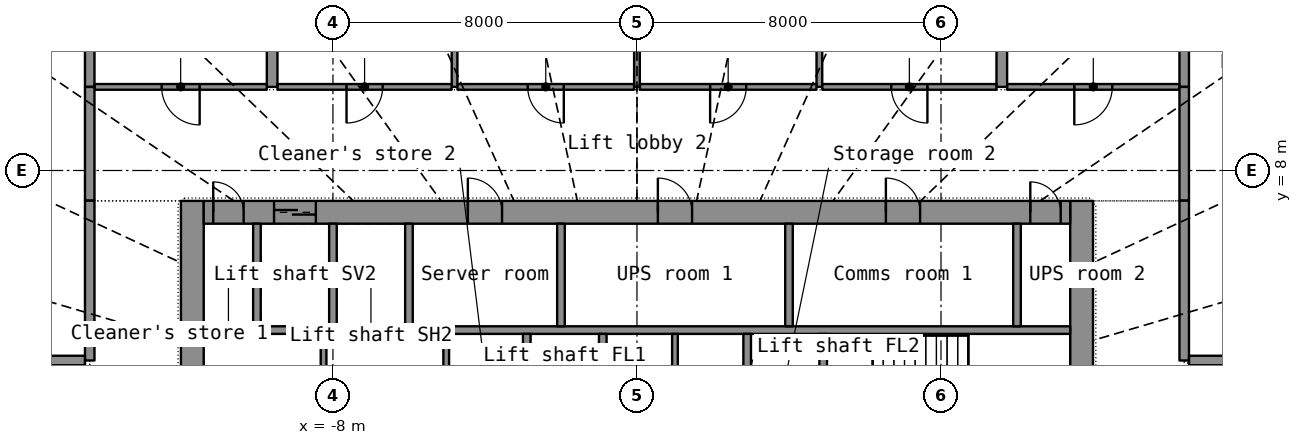
"""IFC4 building model, lengths in metres.
Left out: names, types, materials, properties, quantities, classifications, styles, units other than length and angle.
Written with IfcOpenShell. Run it as: python <this file> out.ifc"""

import sys

from ifc_helpers import new_model, si_unit, direction, frame, frame_2d, origin, place, context, subcontext, project, spatial, rectangle, extrude, element, fill, save


model = new_model("IFC4")
c1 = context("Model", 3, precision=1e-05, world=origin(), true_north=direction((0.0, 1.0)))
c2 = subcontext(c1, "Body", "Model", "MODEL_VIEW")
j1 = project(units=[si_unit("LENGTHUNIT", "METRE"), si_unit("PLANEANGLEUNIT", "RADIAN")], contexts=[c1])
p1 = place(None, origin())
s1 = spatial("IfcSite", under=j1, at=p1, CompositionType="ELEMENT")
p2 = place(p1, origin())
s2 = spatial("IfcBuilding", under=s1, at=p2, CompositionType="ELEMENT")
p3 = place(p2, frame((0.0, 0.0, 7.0)))
s3 = spatial("IfcBuildingStorey", under=s2, at=p3, CompositionType="ELEMENT", Elevation=7.0)
p4 = place(p3, frame((-11.7, -7.2, 0.0), z_axis=(0.0, 0.0, 1.0), x_axis=(0.0, 1.0, 0.0)))
e1 = element("IfcWall", 1, at=p4, inside=s3, PredefinedType="SHEAR", context=c2, shape_type="SweptSolid", body=[
    extrude(rectangle(XDim=14.4, YDim=0.6, at=frame_2d((7.2, 0.0))), origin(), (0.0, 0.0, 1.0), 6.1),
])
p5 = place(p4, frame((6.5, 0.0, 0.0)))
e2 = element("IfcOpeningElement", 2, at=p5, cuts=e1, PredefinedType="OPENING", context=c2, shape_type="SweptSolid", body=[
    extrude(rectangle(XDim=1.4, YDim=2.2, at=frame_2d((0.7, 1.1))), frame((0.0, 0.31, 0.0), z_axis=(0.0, -1.0, 0.0), x_axis=(1.0, 0.0, 0.0)), (0.0, 0.0, 1.0), 0.62),
])
p6 = place(p3, frame((11.7, -7.2, 0.0), z_axis=(0.0, 0.0, 1.0), x_axis=(0.0, 1.0, 0.0)))
e3 = element("IfcWall", 3, at=p6, inside=s3, PredefinedType="SHEAR", context=c2, shape_type="SweptSolid", body=[
    extrude(rectangle(XDim=14.4, YDim=0.6, at=frame_2d((7.2, 0.0))), origin(), (0.0, 0.0, 1.0), 6.1),
])
p7 = place(p6, frame((6.5, 0.0, 0.0)))
e4 = element("IfcOpeningElement", 4, at=p7, cuts=e3, PredefinedType="OPENING", context=c2, shape_type="SweptSolid", body=[
    extrude(rectangle(XDim=1.4, YDim=2.2, at=frame_2d((0.7, 1.1))), frame((0.0, 0.31, 0.0), z_axis=(0.0, -1.0, 0.0), x_axis=(1.0, 0.0, 0.0)), (0.0, 0.0, 1.0), 0.62),
])
p8 = place(p3, frame((-11.4, 6.9, 0.0), z_axis=(0.0, 0.0, 1.0), x_axis=(1.0, 0.0, 0.0)))
e5 = element("IfcWall", 5, at=p8, inside=s3, PredefinedType="SHEAR", context=c2, shape_type="SweptSolid", body=[
    extrude(rectangle(XDim=22.8, YDim=0.6, at=frame_2d((11.4, 0.0))), origin(), (0.0, 0.0, 1.0), 6.1),
])
p9 = place(p8, frame((1.85, 0.0, 0.0)))
e6 = element("IfcOpeningElement", 6, at=p9, cuts=e5, PredefinedType="OPENING", context=c2, shape_type="SweptSolid", body=[
    extrude(rectangle(XDim=1.1, YDim=2.2, at=frame_2d((0.55, 1.1))), frame((0.0, 0.31, 0.0), z_axis=(0.0, -1.0, 0.0), x_axis=(1.0, 0.0, 0.0)), (0.0, 0.0, 1.0), 0.62),
])
p10 = place(p8, frame((6.95, 0.0, 0.0)))
e7 = element("IfcOpeningElement", 7, at=p10, cuts=e5, PredefinedType="OPENING", context=c2, shape_type="SweptSolid", body=[
    extrude(rectangle(XDim=0.9, YDim=2.1, at=frame_2d((0.45, 1.05))), frame((0.0, 0.31, 0.0), z_axis=(0.0, -1.0, 0.0), x_axis=(1.0, 0.0, 0.0)), (0.0, 0.0, 1.0), 0.62),
])
p11 = place(p8, frame((11.95, 0.0, 0.0)))
e8 = element("IfcOpeningElement", 8, at=p11, cuts=e5, PredefinedType="OPENING", context=c2, shape_type="SweptSolid", body=[
    extrude(rectangle(XDim=0.9, YDim=2.1, at=frame_2d((0.45, 1.05))), frame((0.0, 0.31, 0.0), z_axis=(0.0, -1.0, 0.0), x_axis=(1.0, 0.0, 0.0)), (0.0, 0.0, 1.0), 0.62),
])
p12 = place(p8, frame((17.95, 0.0, 0.0)))
e9 = element("IfcOpeningElement", 9, at=p12, cuts=e5, PredefinedType="OPENING", context=c2, shape_type="SweptSolid", body=[
    extrude(rectangle(XDim=0.9, YDim=2.1, at=frame_2d((0.45, 1.05))), frame((0.0, 0.31, 0.0), z_axis=(0.0, -1.0, 0.0), x_axis=(1.0, 0.0, 0.0)), (0.0, 0.0, 1.0), 0.62),
])
p13 = place(p8, frame((0.25, 0.0, 0.0)))
e10 = element("IfcOpeningElement", 10, at=p13, cuts=e5, PredefinedType="OPENING", context=c2, shape_type="SweptSolid", body=[
    extrude(rectangle(XDim=0.8, YDim=2.05, at=frame_2d((0.4, 1.025))), frame((0.0, 0.31, 0.0), z_axis=(0.0, -1.0, 0.0), x_axis=(1.0, 0.0, 0.0)), (0.0, 0.0, 1.0), 0.62),
])
p14 = place(p8, frame((21.75, 0.0, 0.0)))
e11 = element("IfcOpeningElement", 11, at=p14, cuts=e5, PredefinedType="OPENING", context=c2, shape_type="SweptSolid", body=[
    extrude(rectangle(XDim=0.8, YDim=2.05, at=frame_2d((0.4, 1.025))), frame((0.0, 0.31, 0.0), z_axis=(0.0, -1.0, 0.0), x_axis=(1.0, 0.0, 0.0)), (0.0, 0.0, 1.0), 0.62),
])
p15 = place(p3, frame((-11.4, 3.8, 0.0), z_axis=(0.0, 0.0, 1.0), x_axis=(1.0, 0.0, 0.0)))
e12 = element("IfcWall", 12, at=p15, inside=s3, PredefinedType="SHEAR", context=c2, shape_type="SweptSolid", body=[
    extrude(rectangle(XDim=22.8, YDim=0.2, at=frame_2d((11.4, 0.0))), origin(), (0.0, 0.0, 1.0), 6.1),
])
for number, where, z_axis, x_axis in (
    (13, (-10.0, 3.9, 0.0), (0.0, 0.0, 1.0), (0.0, 1.0, 0.0)),
    (14, (-8.0, 3.9, 0.0), (0.0, 0.0, 1.0), (0.0, 1.0, 0.0)),
    (15, (-6.0, 3.9, 0.0), (0.0, 0.0, 1.0), (0.0, 1.0, 0.0)),
    (16, (10.0, 3.9, 0.0), (0.0, 0.0, 1.0), (0.0, 1.0, 0.0)),
):
    element("IfcWall", number, at=place(p3, frame(where, z_axis=z_axis, x_axis=x_axis)), inside=s3, PredefinedType="SHEAR", context=c2, shape_type="SweptSolid", body=[
        extrude(rectangle(XDim=2.7, YDim=0.2, at=frame_2d((1.35, 0.0))), origin(), (0.0, 0.0, 1.0), 6.1),
    ])
for number, where, z_axis, x_axis in (
    (17, (-2.0, 3.9, 0.0), (0.0, 0.0, 1.0), (0.0, 1.0, 0.0)),
    (18, (4.0, 3.9, 0.0), (0.0, 0.0, 1.0), (0.0, 1.0, 0.0)),
):
    element("IfcWall", number, at=place(p3, frame(where, z_axis=z_axis, x_axis=x_axis)), inside=s3, PredefinedType="PARTITIONING", context=c2, shape_type="SweptSolid", body=[
        extrude(rectangle(XDim=2.7, YDim=0.2, at=frame_2d((1.35, 0.0))), origin(), (0.0, 0.0, 1.0), 6.1),
    ])
p16 = place(p3, frame((-2.9, -3.7, 0.0), z_axis=(0.0, 0.0, 1.0), x_axis=(0.0, 1.0, 0.0)))
e19 = element("IfcWall", 19, at=p16, inside=s3, PredefinedType="SHEAR", context=c2, shape_type="SweptSolid", body=[
    extrude(rectangle(XDim=7.4, YDim=0.2, at=frame_2d((3.7, 0.0))), origin(), (0.0, 0.0, 1.0), 6.1),
])
p17 = place(p16, frame((3.1, 0.0, 0.0)))
e20 = element("IfcOpeningElement", 20, at=p17, cuts=e19, PredefinedType="OPENING", context=c2, shape_type="SweptSolid", body=[
    extrude(rectangle(XDim=1.2, YDim=2.2, at=frame_2d((0.6, 1.1))), frame((0.0, 0.11, 0.0), z_axis=(0.0, -1.0, 0.0), x_axis=(1.0, 0.0, 0.0)), (0.0, 0.0, 1.0), 0.22),
])
p18 = place(p3, frame((2.9, -3.7, 0.0), z_axis=(0.0, 0.0, 1.0), x_axis=(0.0, 1.0, 0.0)))
e21 = element("IfcWall", 21, at=p18, inside=s3, PredefinedType="SHEAR", context=c2, shape_type="SweptSolid", body=[
    extrude(rectangle(XDim=7.4, YDim=0.2, at=frame_2d((3.7, 0.0))), origin(), (0.0, 0.0, 1.0), 6.1),
])
p19 = place(p18, frame((3.1, 0.0, 0.0)))
e22 = element("IfcOpeningElement", 22, at=p19, cuts=e21, PredefinedType="OPENING", context=c2, shape_type="SweptSolid", body=[
    extrude(rectangle(XDim=1.2, YDim=2.2, at=frame_2d((0.6, 1.1))), frame((0.0, 0.11, 0.0), z_axis=(0.0, -1.0, 0.0), x_axis=(1.0, 0.0, 0.0)), (0.0, 0.0, 1.0), 0.22),
])
for number, where, z_axis, x_axis in (
    (23, (-0.9, 1.35, 0.0), (0.0, 0.0, 1.0), (0.0, 1.0, 0.0)),
    (24, (4.9, 1.35, 0.0), (0.0, 0.0, 1.0), (0.0, 1.0, 0.0)),
):
    element("IfcWall", number, at=place(p3, frame(where, z_axis=z_axis, x_axis=x_axis)), inside=s3, PredefinedType="SHEAR", context=c2, shape_type="SweptSolid", body=[
        extrude(rectangle(XDim=2.35, YDim=0.2, at=frame_2d((1.175, 0.0))), origin(), (0.0, 0.0, 1.0), 6.1),
    ])
for number, where, z_axis, x_axis in (
    (25, (-8.247, 1.35, 0.0), (0.0, 0.0, 1.0), (0.0, 1.0, 0.0)),
    (26, (-5.019, 1.35, 0.0), (0.0, 0.0, 1.0), (0.0, 1.0, 0.0)),
    (27, (1.0, 1.35, 0.0), (0.0, 0.0, 1.0), (0.0, 1.0, 0.0)),
):
    element("IfcWall", number, at=place(p3, frame(where, z_axis=z_axis, x_axis=x_axis)), inside=s3, PredefinedType="PARTITIONING", context=c2, shape_type="SweptSolid", body=[
        extrude(rectangle(XDim=2.35, YDim=0.15, at=frame_2d((1.175, 0.0))), origin(), (0.0, 0.0, 1.0), 6.1),
    ])
p20 = place(p3, frame((0.0, 10.2, 0.0), z_axis=(0.0, 0.0, 1.0), x_axis=(0.0, 1.0, 0.0)))
e28 = element("IfcWall", 28, at=p20, inside=s3, PredefinedType="PARTITIONING", context=c2, shape_type="SweptSolid", body=[
    extrude(rectangle(XDim=13.616, YDim=0.15, at=frame_2d((6.808, 0.0))), origin(), (0.0, 0.0, 1.0), 5.1),
])
for number, where, z_axis, x_axis in (
    (29, (-4.8, 10.2, 0.0), (0.0, 0.0, 1.0), (0.0, 1.0, 0.0)),
    (30, (4.8, 10.2, 0.0), (0.0, 0.0, 1.0), (0.0, 1.0, 0.0)),
):
    element("IfcWall", number, at=place(p3, frame(where, z_axis=z_axis, x_axis=x_axis)), inside=s3, PredefinedType="PARTITIONING", context=c2, shape_type="SweptSolid", body=[
        extrude(rectangle(XDim=13.16, YDim=0.15, at=frame_2d((6.58, 0.0))), origin(), (0.0, 0.0, 1.0), 5.1),
    ])
p21 = place(p3, frame((-9.6, 10.2, 0.0), z_axis=(0.0, 0.0, 1.0), x_axis=(0.0, 1.0, 0.0)))
e31 = element("IfcWall", 31, at=p21, inside=s3, PredefinedType="PARTITIONING", context=c2, shape_type="SweptSolid", body=[
    extrude(rectangle(XDim=12.103, YDim=0.28, at=frame_2d((6.051, 0.0))), origin(), (0.0, 0.0, 1.0), 5.1),
])
p22 = place(p21, frame((4.851, 0.0, 1.0)))
e32 = element("IfcOpeningElement", 32, at=p22, cuts=e31, PredefinedType="OPENING", context=c2, shape_type="SweptSolid", body=[
    extrude(rectangle(XDim=2.4, YDim=1.2, at=frame_2d((1.2, 0.6))), frame((0.0, 0.15, 0.0), z_axis=(0.0, -1.0, 0.0), x_axis=(1.0, 0.0, 0.0)), (0.0, 0.0, 1.0), 0.3),
])
p23 = place(p3, frame((9.6, 10.2, 0.0), z_axis=(0.0, 0.0, 1.0), x_axis=(0.0, 1.0, 0.0)))
e33 = element("IfcWall", 33, at=p23, inside=s3, PredefinedType="PARTITIONING", context=c2, shape_type="SweptSolid", body=[
    extrude(rectangle(XDim=12.103, YDim=0.28, at=frame_2d((6.051, 0.0))), origin(), (0.0, 0.0, 1.0), 5.1),
])
p24 = place(p23, frame((4.851, 0.0, 1.0)))
e34 = element("IfcOpeningElement", 34, at=p24, cuts=e33, PredefinedType="OPENING", context=c2, shape_type="SweptSolid", body=[
    extrude(rectangle(XDim=2.4, YDim=1.2, at=frame_2d((1.2, 0.6))), frame((0.0, 0.15, 0.0), z_axis=(0.0, -1.0, 0.0), x_axis=(1.0, 0.0, 0.0)), (0.0, 0.0, 1.0), 0.3),
])
p25 = place(p3, frame((-14.4, 10.2, 0.0), z_axis=(0.0, 0.0, 1.0), x_axis=(0.0, 1.0, 0.0)))
e35 = element("IfcWall", 35, at=p25, inside=s3, PredefinedType="PARTITIONING", context=c2, shape_type="SweptSolid", body=[
    extrude(rectangle(XDim=10.474, YDim=0.25, at=frame_2d((5.237, 0.0))), origin(), (0.0, 0.0, 1.0), 5.1),
])
p26 = place(p25, frame((4.037, 0.0, 1.0)))
e36 = element("IfcOpeningElement", 36, at=p26, cuts=e35, PredefinedType="OPENING", context=c2, shape_type="SweptSolid", body=[
    extrude(rectangle(XDim=2.4, YDim=1.2, at=frame_2d((1.2, 0.6))), frame((0.0, 0.135, 0.0), z_axis=(0.0, -1.0, 0.0), x_axis=(1.0, 0.0, 0.0)), (0.0, 0.0, 1.0), 0.27),
])
p27 = place(p3, frame((14.4, 20.674, 0.0), z_axis=(0.0, 0.0, 1.0), x_axis=(0.0, -1.0, 0.0)))
e37 = element("IfcWall", 37, at=p27, inside=s3, PredefinedType="PARTITIONING", context=c2, shape_type="SweptSolid", body=[
    extrude(rectangle(XDim=10.474, YDim=0.25, at=frame_2d((5.237, 0.0))), origin(), (0.0, 0.0, 1.0), 5.1),
])
p28 = place(p27, frame((4.037, 0.0, 1.0)))
e38 = element("IfcOpeningElement", 38, at=p28, cuts=e37, PredefinedType="OPENING", context=c2, shape_type="SweptSolid", body=[
    extrude(rectangle(XDim=2.4, YDim=1.2, at=frame_2d((1.2, 0.6))), frame((0.0, 0.135, 0.0), z_axis=(0.0, -1.0, 0.0), x_axis=(1.0, 0.0, 0.0)), (0.0, 0.0, 1.0), 0.27),
])
p29 = place(p3, frame((-9.742, 10.2, 0.0), z_axis=(0.0, 0.0, 1.0), x_axis=(-1.0, 0.0, 0.0)))
e39 = element("IfcWall", 39, at=p29, inside=s3, PredefinedType="PARTITIONING", context=c2, shape_type="SweptSolid", body=[
    extrude(rectangle(XDim=4.531, YDim=0.15, at=frame_2d((2.266, 0.0))), origin(), (0.0, 0.0, 1.0), 5.1),
])
p30 = place(p29, frame((1.765, 0.0, 0.0)))
e40 = element("IfcOpeningElement", 40, at=p30, cuts=e39, PredefinedType="OPENING", context=c2, shape_type="SweptSolid", body=[
    extrude(rectangle(XDim=1.0, YDim=2.2, at=frame_2d((0.5, 1.1))), frame((0.0, 0.085, 0.0), z_axis=(0.0, -1.0, 0.0), x_axis=(1.0, 0.0, 0.0)), (0.0, 0.0, 1.0), 0.17),
])
p31 = place(p3, frame((14.273, 10.2, 0.0), z_axis=(0.0, 0.0, 1.0), x_axis=(-1.0, 0.0, 0.0)))
e41 = element("IfcWall", 41, at=p31, inside=s3, PredefinedType="PARTITIONING", context=c2, shape_type="SweptSolid", body=[
    extrude(rectangle(XDim=4.531, YDim=0.15, at=frame_2d((2.266, 0.0))), origin(), (0.0, 0.0, 1.0), 5.1),
])
p32 = place(p31, frame((1.765, 0.0, 0.0)))
e42 = element("IfcOpeningElement", 42, at=p32, cuts=e41, PredefinedType="OPENING", context=c2, shape_type="SweptSolid", body=[
    extrude(rectangle(XDim=1.0, YDim=2.2, at=frame_2d((0.5, 1.1))), frame((0.0, 0.085, 0.0), z_axis=(0.0, -1.0, 0.0), x_axis=(1.0, 0.0, 0.0)), (0.0, 0.0, 1.0), 0.17),
])
p33 = place(p3, frame((-4.877, 10.2, 0.0), z_axis=(0.0, 0.0, 1.0), x_axis=(-1.0, 0.0, 0.0)))
e43 = element("IfcWall", 43, at=p33, inside=s3, PredefinedType="PARTITIONING", context=c2, shape_type="SweptSolid", body=[
    extrude(rectangle(XDim=4.581, YDim=0.15, at=frame_2d((2.291, 0.0))), origin(), (0.0, 0.0, 1.0), 5.1),
])
p34 = place(p33, frame((1.815, 0.0, 0.0)))
e44 = element("IfcOpeningElement", 44, at=p34, cuts=e43, PredefinedType="OPENING", context=c2, shape_type="SweptSolid", body=[
    extrude(rectangle(XDim=0.95, YDim=2.15, at=frame_2d((0.475, 1.075))), frame((0.0, 0.085, 0.0), z_axis=(0.0, -1.0, 0.0), x_axis=(1.0, 0.0, 0.0)), (0.0, 0.0, 1.0), 0.17),
])
p35 = place(p3, frame((-0.077, 10.2, 0.0), z_axis=(0.0, 0.0, 1.0), x_axis=(-1.0, 0.0, 0.0)))
e45 = element("IfcWall", 45, at=p35, inside=s3, PredefinedType="PARTITIONING", context=c2, shape_type="SweptSolid", body=[
    extrude(rectangle(XDim=4.646, YDim=0.15, at=frame_2d((2.323, 0.0))), origin(), (0.0, 0.0, 1.0), 5.1),
])
p36 = place(p35, frame((1.848, 0.0, 0.0)))
e46 = element("IfcOpeningElement", 46, at=p36, cuts=e45, PredefinedType="OPENING", context=c2, shape_type="SweptSolid", body=[
    extrude(rectangle(XDim=0.95, YDim=2.15, at=frame_2d((0.475, 1.075))), frame((0.0, 0.085, 0.0), z_axis=(0.0, -1.0, 0.0), x_axis=(1.0, 0.0, 0.0)), (0.0, 0.0, 1.0), 0.17),
])
p37 = place(p3, frame((4.723, 10.2, 0.0), z_axis=(0.0, 0.0, 1.0), x_axis=(-1.0, 0.0, 0.0)))
e47 = element("IfcWall", 47, at=p37, inside=s3, PredefinedType="PARTITIONING", context=c2, shape_type="SweptSolid", body=[
    extrude(rectangle(XDim=4.646, YDim=0.15, at=frame_2d((2.323, 0.0))), origin(), (0.0, 0.0, 1.0), 5.1),
])
p38 = place(p37, frame((1.848, 0.0, 0.0)))
e48 = element("IfcOpeningElement", 48, at=p38, cuts=e47, PredefinedType="OPENING", context=c2, shape_type="SweptSolid", body=[
    extrude(rectangle(XDim=0.95, YDim=2.15, at=frame_2d((0.475, 1.075))), frame((0.0, 0.085, 0.0), z_axis=(0.0, -1.0, 0.0), x_axis=(1.0, 0.0, 0.0)), (0.0, 0.0, 1.0), 0.17),
])
p39 = place(p3, frame((9.458, 10.2, 0.0), z_axis=(0.0, 0.0, 1.0), x_axis=(-1.0, 0.0, 0.0)))
e49 = element("IfcWall", 49, at=p39, inside=s3, PredefinedType="PARTITIONING", context=c2, shape_type="SweptSolid", body=[
    extrude(rectangle(XDim=4.581, YDim=0.15, at=frame_2d((2.291, 0.0))), origin(), (0.0, 0.0, 1.0), 5.1),
])
p40 = place(p39, frame((1.815, 0.0, 0.0)))
e50 = element("IfcOpeningElement", 50, at=p40, cuts=e49, PredefinedType="OPENING", context=c2, shape_type="SweptSolid", body=[
    extrude(rectangle(XDim=0.95, YDim=2.15, at=frame_2d((0.475, 1.075))), frame((0.0, 0.085, 0.0), z_axis=(0.0, -1.0, 0.0), x_axis=(1.0, 0.0, 0.0)), (0.0, 0.0, 1.0), 0.17),
])
for number, where, z_axis, x_axis in (
    (51, (-14.4, 7.212, 0.0), (0.0, 0.0, 1.0), (0.0, -1.0, 0.0)),
    (52, (14.4, 3.0, 0.0), (0.0, 0.0, 1.0), (0.0, 1.0, 0.0)),
):
    element("IfcWall", number, at=place(p3, frame(where, z_axis=z_axis, x_axis=x_axis)), inside=s3, PredefinedType="PARTITIONING", context=c2, shape_type="SweptSolid", body=[
        extrude(rectangle(XDim=4.212, YDim=0.25, at=frame_2d((2.106, 0.0))), origin(), (0.0, 0.0, 1.0), 5.1),
    ])
for number, where, z_axis, x_axis in (
    (53, (-14.4, 10.199, 0.0), (0.0, 0.0, 1.0), (0.0, -1.0, 0.0)),
    (54, (14.4, 7.213, 0.0), (0.0, 0.0, 1.0), (0.0, 1.0, 0.0)),
):
    element("IfcWall", number, at=place(p3, frame(where, z_axis=z_axis, x_axis=x_axis)), inside=s3, PredefinedType="PARTITIONING", context=c2, shape_type="SweptSolid", body=[
        extrude(rectangle(XDim=2.986, YDim=0.25, at=frame_2d((1.493, 0.0))), origin(), (0.0, 0.0, 1.0), 5.1),
    ])
for number, where, z_axis, x_axis in (
    (55, (-14.527, 3.0, 0.0), (0.0, 0.0, 1.0), (-1.0, 0.0, 0.0)),
    (56, (17.273, 3.0, 0.0), (0.0, 0.0, 1.0), (-1.0, 0.0, 0.0)),
):
    element("IfcWall", number, at=place(p3, frame(where, z_axis=z_axis, x_axis=x_axis)), inside=s3, PredefinedType="PARTITIONING", context=c2, shape_type="SweptSolid", body=[
        extrude(rectangle(XDim=2.746, YDim=0.25, at=frame_2d((1.373, 0.0))), origin(), (0.0, 0.0, 1.0), 5.1),
    ])
p41 = place(p9, origin())
e57 = element("IfcDoor", 57, at=p41, inside=s3, OperationType="DOUBLE_DOOR_SLIDING", PredefinedType="DOOR", context=c2, shape_type="SweptSolid", body=[
    extrude(rectangle(XDim=1.1, YDim=2.2, at=frame_2d((0.55, 1.1))), frame((0.0, 0.025, 0.0), z_axis=(0.0, -1.0, 0.0), x_axis=(1.0, 0.0, 0.0)), (0.0, 0.0, 1.0), 0.05),
])
fill(e6, e57)
p42 = place(p10, origin())
e58 = element("IfcDoor", 58, at=p42, inside=s3, OperationType="SINGLE_SWING_LEFT", PredefinedType="DOOR", context=c2, shape_type="SweptSolid", body=[
    extrude(rectangle(XDim=0.9, YDim=2.1, at=frame_2d((0.45, 1.05))), frame((0.0, 0.025, 0.0), z_axis=(0.0, -1.0, 0.0), x_axis=(1.0, 0.0, 0.0)), (0.0, 0.0, 1.0), 0.05),
])
fill(e7, e58)
p43 = place(p11, origin())
e59 = element("IfcDoor", 59, at=p43, inside=s3, OperationType="SINGLE_SWING_LEFT", PredefinedType="DOOR", context=c2, shape_type="SweptSolid", body=[
    extrude(rectangle(XDim=0.9, YDim=2.1, at=frame_2d((0.45, 1.05))), frame((0.0, 0.025, 0.0), z_axis=(0.0, -1.0, 0.0), x_axis=(1.0, 0.0, 0.0)), (0.0, 0.0, 1.0), 0.05),
])
fill(e8, e59)
p44 = place(p12, origin())
e60 = element("IfcDoor", 60, at=p44, inside=s3, OperationType="SINGLE_SWING_LEFT", PredefinedType="DOOR", context=c2, shape_type="SweptSolid", body=[
    extrude(rectangle(XDim=0.9, YDim=2.1, at=frame_2d((0.45, 1.05))), frame((0.0, 0.025, 0.0), z_axis=(0.0, -1.0, 0.0), x_axis=(1.0, 0.0, 0.0)), (0.0, 0.0, 1.0), 0.05),
])
fill(e9, e60)
p45 = place(p13, origin())
e61 = element("IfcDoor", 61, at=p45, inside=s3, OperationType="SINGLE_SWING_LEFT", PredefinedType="DOOR", context=c2, shape_type="SweptSolid", body=[
    extrude(rectangle(XDim=0.8, YDim=2.05, at=frame_2d((0.4, 1.025))), frame((0.0, 0.025, 0.0), z_axis=(0.0, -1.0, 0.0), x_axis=(1.0, 0.0, 0.0)), (0.0, 0.0, 1.0), 0.05),
])
fill(e10, e61)
p46 = place(p14, origin())
e62 = element("IfcDoor", 62, at=p46, inside=s3, OperationType="SINGLE_SWING_LEFT", PredefinedType="DOOR", context=c2, shape_type="SweptSolid", body=[
    extrude(rectangle(XDim=0.8, YDim=2.05, at=frame_2d((0.4, 1.025))), frame((0.0, 0.025, 0.0), z_axis=(0.0, -1.0, 0.0), x_axis=(1.0, 0.0, 0.0)), (0.0, 0.0, 1.0), 0.05),
])
fill(e11, e62)
p47 = place(p30, origin())
e63 = element("IfcDoor", 63, at=p47, inside=s3, OperationType="SINGLE_SWING_LEFT", PredefinedType="DOOR", context=c2, shape_type="SweptSolid", body=[
    extrude(rectangle(XDim=1.0, YDim=2.2, at=frame_2d((0.5, 1.1))), frame((0.0, 0.025, 0.0), z_axis=(0.0, -1.0, 0.0), x_axis=(1.0, 0.0, 0.0)), (0.0, 0.0, 1.0), 0.05),
])
fill(e40, e63)
p48 = place(p34, origin())
e64 = element("IfcDoor", 64, at=p48, inside=s3, OperationType="SINGLE_SWING_RIGHT", PredefinedType="DOOR", context=c2, shape_type="SweptSolid", body=[
    extrude(rectangle(XDim=0.95, YDim=2.15, at=frame_2d((0.475, 1.075))), frame((0.0, 0.025, 0.0), z_axis=(0.0, -1.0, 0.0), x_axis=(1.0, 0.0, 0.0)), (0.0, 0.0, 1.0), 0.05),
])
fill(e44, e64)
p49 = place(p36, origin())
e65 = element("IfcDoor", 65, at=p49, inside=s3, OperationType="SINGLE_SWING_LEFT", PredefinedType="DOOR", context=c2, shape_type="SweptSolid", body=[
    extrude(rectangle(XDim=0.95, YDim=2.15, at=frame_2d((0.475, 1.075))), frame((0.0, 0.025, 0.0), z_axis=(0.0, -1.0, 0.0), x_axis=(1.0, 0.0, 0.0)), (0.0, 0.0, 1.0), 0.05),
])
fill(e46, e65)
p50 = place(p38, origin())
e66 = element("IfcDoor", 66, at=p50, inside=s3, OperationType="SINGLE_SWING_RIGHT", PredefinedType="DOOR", context=c2, shape_type="SweptSolid", body=[
    extrude(rectangle(XDim=0.95, YDim=2.15, at=frame_2d((0.475, 1.075))), frame((0.0, 0.025, 0.0), z_axis=(0.0, -1.0, 0.0), x_axis=(1.0, 0.0, 0.0)), (0.0, 0.0, 1.0), 0.05),
])
fill(e48, e66)
p51 = place(p40, origin())
e67 = element("IfcDoor", 67, at=p51, inside=s3, OperationType="SINGLE_SWING_LEFT", PredefinedType="DOOR", context=c2, shape_type="SweptSolid", body=[
    extrude(rectangle(XDim=0.95, YDim=2.15, at=frame_2d((0.475, 1.075))), frame((0.0, 0.025, 0.0), z_axis=(0.0, -1.0, 0.0), x_axis=(1.0, 0.0, 0.0)), (0.0, 0.0, 1.0), 0.05),
])
fill(e50, e67)
p52 = place(p32, origin())
e68 = element("IfcDoor", 68, at=p52, inside=s3, OperationType="SINGLE_SWING_RIGHT", PredefinedType="DOOR", context=c2, shape_type="SweptSolid", body=[
    extrude(rectangle(XDim=1.0, YDim=2.2, at=frame_2d((0.5, 1.1))), frame((0.0, 0.025, 0.0), z_axis=(0.0, -1.0, 0.0), x_axis=(1.0, 0.0, 0.0)), (0.0, 0.0, 1.0), 0.05),
])
fill(e42, e68)
save(model, sys.argv[1])
